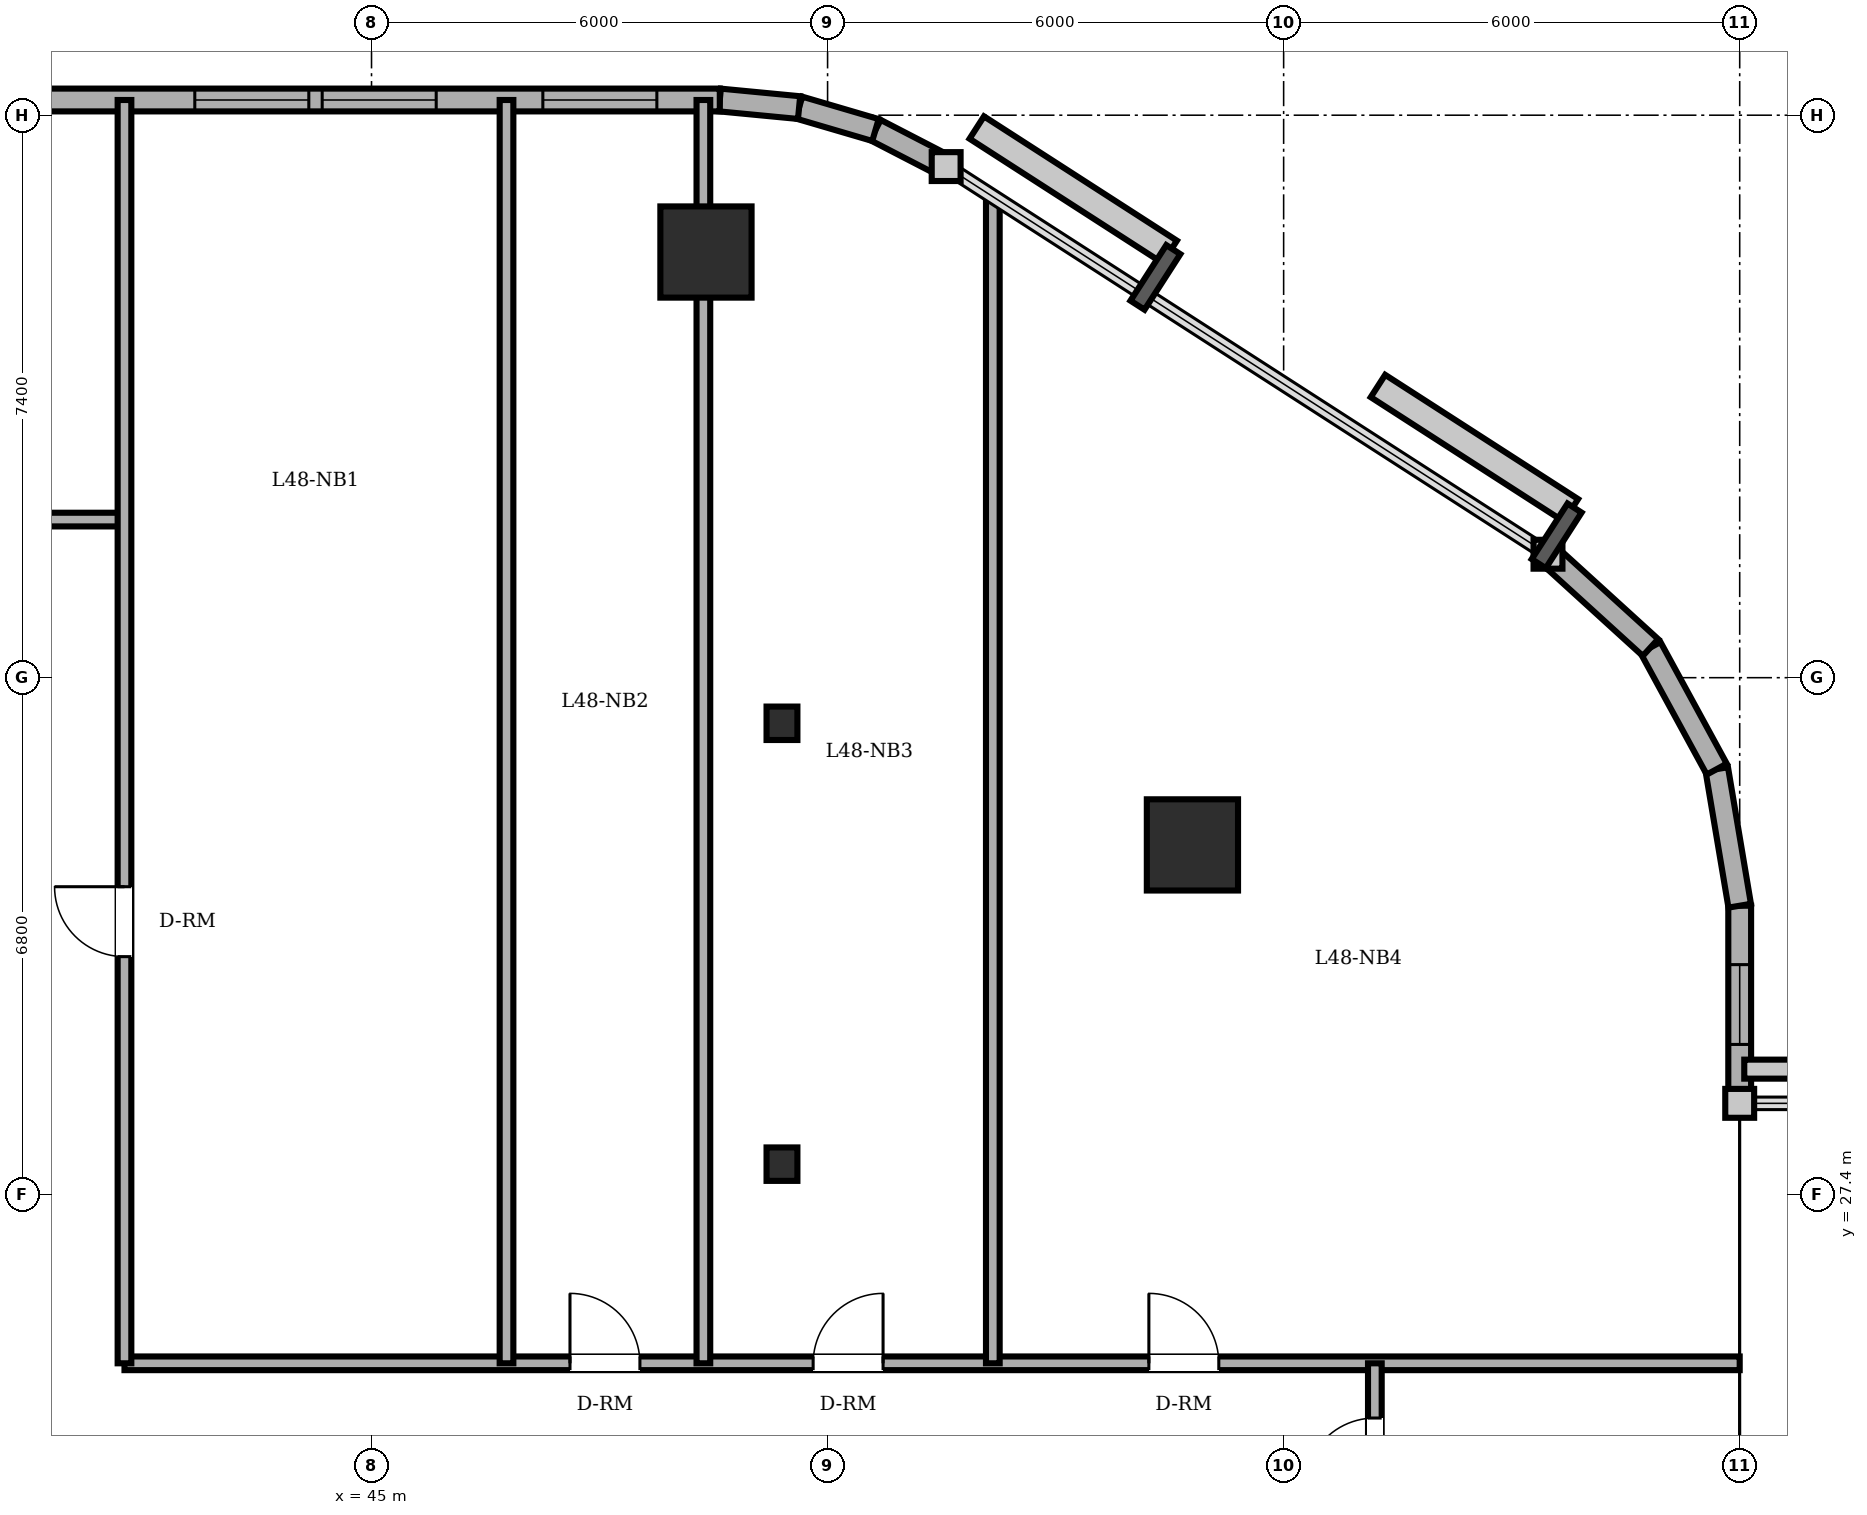
"""IFC4 building model, lengths in metres.
Left out: names, types, materials, properties, quantities, classifications, styles, units other than length and angle.
Written with IfcOpenShell. Run it as: python <this file> out.ifc"""

import sys

from ifc_helpers import new_model, si_unit, direction, frame, frame_2d, origin, origin_2d, place, context, subcontext, project, spatial, rectangle, circle, i_section, extrude, element, fill, save


model = new_model("IFC4")
c1 = context("Model", 3, precision=1e-05, world=origin(), true_north=direction((0.0, 1.0)))
c2 = subcontext(c1, "Body", "Model", "MODEL_VIEW")
j1 = project(units=[si_unit("LENGTHUNIT", "METRE"), si_unit("PLANEANGLEUNIT", "RADIAN")], contexts=[c1])
p1 = place(None, origin())
s1 = spatial("IfcSite", under=j1, at=p1, CompositionType="ELEMENT")
p2 = place(p1, origin())
s2 = spatial("IfcBuilding", under=s1, at=p2, CompositionType="ELEMENT")
p3 = place(p2, frame((0.0, 0.0, 183.4)))
s3 = spatial("IfcBuildingStorey", under=s2, at=p3, CompositionType="ELEMENT", Elevation=183.4)
for number, where, z_axis, x_axis in (
    (1, (55.8, 32.0, 0.0), (0.0, 0.0, 1.0), (1.0, 0.0, 0.0)),
    (2, (49.4, 39.8, 0.0), (0.0, 0.0, 1.0), (1.0, 0.0, 0.0)),
):
    element("IfcColumn", number, at=place(p3, frame(where, z_axis=z_axis, x_axis=x_axis)), inside=s3, PredefinedType="COLUMN", context=c2, shape_type="SweptSolid", body=[
        extrude(circle(Radius=0.6, at=origin_2d()), origin(), (0.0, 0.0, 1.0), 3.6),
    ])
for number, where, z_axis, x_axis in (
    (3, (50.4, 27.8, 0.0), (0.0, 0.0, 1.0), (1.0, 0.0, 0.0)),
    (4, (50.4, 33.6, 0.0), (0.0, 0.0, 1.0), (1.0, 0.0, 0.0)),
):
    element("IfcColumn", number, at=place(p3, frame(where, z_axis=z_axis, x_axis=x_axis)), inside=s3, PredefinedType="COLUMN", context=c2, shape_type="SweptSolid", body=[
        extrude(i_section(OverallWidth=0.406, OverallDepth=0.44, WebThickness=0.024, FlangeThickness=0.039, FilletRadius=0.015, at=origin_2d()), origin(), (0.0, 0.0, 1.0), 3.6),
    ])
p4 = place(p3, frame((63.0, 28.6, 0.0), z_axis=(0.0, 0.0, 1.0), x_axis=(0.0, 1.0, 0.0)))
e5 = element("IfcWall", 5, at=p4, inside=s3, PredefinedType="SOLIDWALL", context=c2, shape_type="SweptSolid", body=[
    extrude(rectangle(XDim=2.6, YDim=0.3, at=frame_2d((1.3, 0.0))), origin(), (0.0, 0.0, 1.0), 3.4),
])
p5 = place(p4, frame((0.775, 0.0, 0.85)))
e6 = element("IfcOpeningElement", 6, at=p5, cuts=e5, PredefinedType="OPENING", context=c2, shape_type="SweptSolid", body=[
    extrude(rectangle(XDim=1.05, YDim=1.55, at=frame_2d((0.525, 0.775))), frame((0.0, 0.16, 0.0), z_axis=(0.0, -1.0, 0.0), x_axis=(1.0, 0.0, 0.0)), (0.0, 0.0, 1.0), 0.32),
])
p6 = place(p3, frame((63.0, 31.2, 0.0), z_axis=(0.0, 0.0, 1.0), x_axis=(-0.165724081207, 0.986172159873, 0.0)))
e7 = element("IfcWall", 7, at=p6, inside=s3, PredefinedType="SOLIDWALL", context=c2, shape_type="SweptSolid", body=[
    extrude(rectangle(XDim=1.822, YDim=0.3, at=frame_2d((0.911, 0.0))), origin(), (0.0, 0.0, 1.0), 3.4),
])
p7 = place(p3, frame((62.698, 32.997, 0.0), z_axis=(0.0, 0.0, 1.0), x_axis=(-0.478608030646, 0.878028674362, 0.0)))
e8 = element("IfcWall", 8, at=p7, inside=s3, PredefinedType="SOLIDWALL", context=c2, shape_type="SweptSolid", body=[
    extrude(rectangle(XDim=1.822, YDim=0.3, at=frame_2d((0.911, 0.0))), origin(), (0.0, 0.0, 1.0), 3.4),
])
p8 = place(p3, frame((61.826, 34.597, 0.0), z_axis=(0.0, 0.0, 1.0), x_axis=(-0.73947929393, 0.673179302897, 0.0)))
e9 = element("IfcWall", 9, at=p8, inside=s3, PredefinedType="SOLIDWALL", context=c2, shape_type="SweptSolid", body=[
    extrude(rectangle(XDim=1.823, YDim=0.3, at=frame_2d((0.911, 0.0))), origin(), (0.0, 0.0, 1.0), 3.4),
])
p9 = place(p3, frame((52.56, 40.924, 0.0), z_axis=(0.0, 0.0, 1.0), x_axis=(-0.888283247196, 0.459296062198, 0.0)))
e10 = element("IfcWall", 10, at=p9, inside=s3, PredefinedType="SOLIDWALL", context=c2, shape_type="SweptSolid", body=[
    extrude(rectangle(XDim=1.047, YDim=0.3, at=frame_2d((0.523, 0.0))), origin(), (0.0, 0.0, 1.0), 3.4),
])
p10 = place(p3, frame((51.63, 41.405, 0.0), z_axis=(0.0, 0.0, 1.0), x_axis=(-0.959528674476, 0.281610942363, 0.0)))
e11 = element("IfcWall", 11, at=p10, inside=s3, PredefinedType="SOLIDWALL", context=c2, shape_type="SweptSolid", body=[
    extrude(rectangle(XDim=1.047, YDim=0.3, at=frame_2d((0.524, 0.0))), origin(), (0.0, 0.0, 1.0), 3.4),
])
p11 = place(p3, frame((50.625, 41.7, 0.0), z_axis=(0.0, 0.0, 1.0), x_axis=(-0.995426089968, 0.095534807324, 0.0)))
e12 = element("IfcWall", 12, at=p11, inside=s3, PredefinedType="SOLIDWALL", context=c2, shape_type="SweptSolid", body=[
    extrude(rectangle(XDim=1.048, YDim=0.3, at=frame_2d((0.524, 0.0))), origin(), (0.0, 0.0, 1.0), 3.4),
])
p12 = place(p3, frame((49.582, 41.8, 0.0), z_axis=(0.0, 0.0, 1.0), x_axis=(-1.0, 0.0, 0.0)))
e13 = element("IfcWall", 13, at=p12, inside=s3, PredefinedType="SOLIDWALL", context=c2, shape_type="SweptSolid", body=[
    extrude(rectangle(XDim=30.282, YDim=0.3, at=frame_2d((15.141, 0.0))), origin(), (0.0, 0.0, 1.0), 3.4),
])
p13 = place(p12, frame((15.107, 0.0, 0.0)))
e14 = element("IfcOpeningElement", 14, at=p13, cuts=e13, PredefinedType="OPENING", context=c2, shape_type="SweptSolid", body=[
    extrude(rectangle(XDim=0.95, YDim=2.2, at=frame_2d((0.475, 1.1))), frame((0.0, 0.16, 0.0), z_axis=(0.0, -1.0, 0.0), x_axis=(1.0, 0.0, 0.0)), (0.0, 0.0, 1.0), 0.32),
])
p14 = place(p12, frame((0.828, 0.0, 0.85)))
e15 = element("IfcOpeningElement", 15, at=p14, cuts=e13, PredefinedType="OPENING", context=c2, shape_type="SweptSolid", body=[
    extrude(rectangle(XDim=1.5, YDim=1.55, at=frame_2d((0.75, 0.775))), frame((0.0, 0.16, 0.0), z_axis=(0.0, -1.0, 0.0), x_axis=(1.0, 0.0, 0.0)), (0.0, 0.0, 1.0), 0.32),
])
p15 = place(p12, frame((3.731, 0.0, 0.85)))
e16 = element("IfcOpeningElement", 16, at=p15, cuts=e13, PredefinedType="OPENING", context=c2, shape_type="SweptSolid", body=[
    extrude(rectangle(XDim=1.5, YDim=1.55, at=frame_2d((0.75, 0.775))), frame((0.0, 0.16, 0.0), z_axis=(0.0, -1.0, 0.0), x_axis=(1.0, 0.0, 0.0)), (0.0, 0.0, 1.0), 0.32),
])
p16 = place(p12, frame((5.407, 0.0, 0.85)))
e17 = element("IfcOpeningElement", 17, at=p16, cuts=e13, PredefinedType="OPENING", context=c2, shape_type="SweptSolid", body=[
    extrude(rectangle(XDim=1.5, YDim=1.55, at=frame_2d((0.75, 0.775))), frame((0.0, 0.16, 0.0), z_axis=(0.0, -1.0, 0.0), x_axis=(1.0, 0.0, 0.0)), (0.0, 0.0, 1.0), 0.32),
])
p17 = place(p12, frame((10.399, 0.0, 0.85)))
e18 = element("IfcOpeningElement", 18, at=p17, cuts=e13, PredefinedType="OPENING", context=c2, shape_type="SweptSolid", body=[
    extrude(rectangle(XDim=1.5, YDim=1.55, at=frame_2d((0.75, 0.775))), frame((0.0, 0.16, 0.0), z_axis=(0.0, -1.0, 0.0), x_axis=(1.0, 0.0, 0.0)), (0.0, 0.0, 1.0), 0.32),
])
p18 = place(p12, frame((18.932, 0.0, 0.85)))
e19 = element("IfcOpeningElement", 19, at=p18, cuts=e13, PredefinedType="OPENING", context=c2, shape_type="SweptSolid", body=[
    extrude(rectangle(XDim=1.5, YDim=1.55, at=frame_2d((0.75, 0.775))), frame((0.0, 0.16, 0.0), z_axis=(0.0, -1.0, 0.0), x_axis=(1.0, 0.0, 0.0)), (0.0, 0.0, 1.0), 0.32),
])
p19 = place(p12, frame((22.532, 0.0, 0.85)))
e20 = element("IfcOpeningElement", 20, at=p19, cuts=e13, PredefinedType="OPENING", context=c2, shape_type="SweptSolid", body=[
    extrude(rectangle(XDim=1.5, YDim=1.55, at=frame_2d((0.75, 0.775))), frame((0.0, 0.16, 0.0), z_axis=(0.0, -1.0, 0.0), x_axis=(1.0, 0.0, 0.0)), (0.0, 0.0, 1.0), 0.32),
])
p20 = place(p12, frame((25.882, 0.0, 0.85)))
e21 = element("IfcOpeningElement", 21, at=p20, cuts=e13, PredefinedType="OPENING", context=c2, shape_type="SweptSolid", body=[
    extrude(rectangle(XDim=1.5, YDim=1.55, at=frame_2d((0.75, 0.775))), frame((0.0, 0.16, 0.0), z_axis=(0.0, -1.0, 0.0), x_axis=(1.0, 0.0, 0.0)), (0.0, 0.0, 1.0), 0.32),
])
p21 = place(p12, frame((27.532, 0.0, 0.85)))
e22 = element("IfcOpeningElement", 22, at=p21, cuts=e13, PredefinedType="OPENING", context=c2, shape_type="SweptSolid", body=[
    extrude(rectangle(XDim=1.5, YDim=1.55, at=frame_2d((0.75, 0.775))), frame((0.0, 0.16, 0.0), z_axis=(0.0, -1.0, 0.0), x_axis=(1.0, 0.0, 0.0)), (0.0, 0.0, 1.0), 0.32),
])
p22 = place(p3, frame((41.75, 25.18, 0.0), z_axis=(0.0, 0.0, 1.0), x_axis=(1.0, 0.0, 0.0)))
e23 = element("IfcWall", 23, at=p22, inside=s3, PredefinedType="PARTITIONING", context=c2, shape_type="SweptSolid", body=[
    extrude(rectangle(XDim=21.25, YDim=0.18, at=frame_2d((10.625, 0.0))), origin(), (0.0, 0.0, 1.0), 3.4),
])
p23 = place(p22, frame((5.861, 0.0, 0.0)))
e24 = element("IfcOpeningElement", 24, at=p23, cuts=e23, PredefinedType="OPENING", context=c2, shape_type="SweptSolid", body=[
    extrude(rectangle(XDim=0.92, YDim=2.1, at=frame_2d((0.46, 1.05))), frame((0.0, 0.1, 0.0), z_axis=(0.0, -1.0, 0.0), x_axis=(1.0, 0.0, 0.0)), (0.0, 0.0, 1.0), 0.2),
])
p24 = place(p22, frame((9.06, 0.0, 0.0)))
e25 = element("IfcOpeningElement", 25, at=p24, cuts=e23, PredefinedType="OPENING", context=c2, shape_type="SweptSolid", body=[
    extrude(rectangle(XDim=0.92, YDim=2.1, at=frame_2d((0.46, 1.05))), frame((0.0, 0.1, 0.0), z_axis=(0.0, -1.0, 0.0), x_axis=(1.0, 0.0, 0.0)), (0.0, 0.0, 1.0), 0.2),
])
p25 = place(p22, frame((13.477, 0.0, 0.0)))
e26 = element("IfcOpeningElement", 26, at=p25, cuts=e23, PredefinedType="OPENING", context=c2, shape_type="SweptSolid", body=[
    extrude(rectangle(XDim=0.92, YDim=2.1, at=frame_2d((0.46, 1.05))), frame((0.0, 0.1, 0.0), z_axis=(0.0, -1.0, 0.0), x_axis=(1.0, 0.0, 0.0)), (0.0, 0.0, 1.0), 0.2),
])
p26 = place(p3, frame((13.8, 36.28, 0.0), z_axis=(0.0, 0.0, 1.0), x_axis=(1.0, 0.0, 0.0)))
e27 = element("IfcWall", 27, at=p26, inside=s3, PredefinedType="PARTITIONING", context=c2, shape_type="SweptSolid", body=[
    extrude(rectangle(XDim=27.95, YDim=0.18, at=frame_2d((13.975, 0.0))), origin(), (0.0, 0.0, 1.0), 3.4),
])
p27 = place(p26, frame((12.05, 0.0, 0.0)))
e28 = element("IfcOpeningElement", 28, at=p27, cuts=e27, PredefinedType="OPENING", context=c2, shape_type="SweptSolid", body=[
    extrude(rectangle(XDim=0.9, YDim=2.1, at=frame_2d((0.45, 1.05))), frame((0.0, 0.1, 0.0), z_axis=(0.0, -1.0, 0.0), x_axis=(1.0, 0.0, 0.0)), (0.0, 0.0, 1.0), 0.2),
])
p28 = place(p26, frame((15.67, 0.0, 0.0)))
e29 = element("IfcOpeningElement", 29, at=p28, cuts=e27, PredefinedType="OPENING", context=c2, shape_type="SweptSolid", body=[
    extrude(rectangle(XDim=0.86, YDim=2.1, at=frame_2d((0.43, 1.05))), frame((0.0, 0.1, 0.0), z_axis=(0.0, -1.0, 0.0), x_axis=(1.0, 0.0, 0.0)), (0.0, 0.0, 1.0), 0.2),
])
p29 = place(p26, frame((5.54, 0.0, 0.0)))
e30 = element("IfcOpeningElement", 30, at=p29, cuts=e27, PredefinedType="OPENING", context=c2, shape_type="SweptSolid", body=[
    extrude(rectangle(XDim=0.92, YDim=2.1, at=frame_2d((0.46, 1.05))), frame((0.0, 0.1, 0.0), z_axis=(0.0, -1.0, 0.0), x_axis=(1.0, 0.0, 0.0)), (0.0, 0.0, 1.0), 0.2),
])
p30 = place(p26, frame((22.255, 0.0, 0.0)))
e31 = element("IfcOpeningElement", 31, at=p30, cuts=e27, PredefinedType="OPENING", context=c2, shape_type="SweptSolid", body=[
    extrude(rectangle(XDim=0.92, YDim=2.1, at=frame_2d((0.46, 1.05))), frame((0.0, 0.1, 0.0), z_axis=(0.0, -1.0, 0.0), x_axis=(1.0, 0.0, 0.0)), (0.0, 0.0, 1.0), 0.2),
])
p31 = place(p3, frame((41.75, 25.18, 0.0), z_axis=(0.0, 0.0, 1.0), x_axis=(0.0, 1.0, 0.0)))
e32 = element("IfcWall", 32, at=p31, inside=s3, PredefinedType="PARTITIONING", context=c2, shape_type="SweptSolid", body=[
    extrude(rectangle(XDim=16.62, YDim=0.18, at=frame_2d((8.31, 0.0))), origin(), (0.0, 0.0, 1.0), 3.4),
])
p32 = place(p31, frame((5.35, 0.0, 0.0)))
e33 = element("IfcOpeningElement", 33, at=p32, cuts=e32, PredefinedType="OPENING", context=c2, shape_type="SweptSolid", body=[
    extrude(rectangle(XDim=0.92, YDim=2.1, at=frame_2d((0.46, 1.05))), frame((0.0, 0.1, 0.0), z_axis=(0.0, -1.0, 0.0), x_axis=(1.0, 0.0, 0.0)), (0.0, 0.0, 1.0), 0.2),
])
p33 = place(p3, frame((46.776, 25.18, 0.0), z_axis=(0.0, 0.0, 1.0), x_axis=(0.0, 1.0, 0.0)))
e34 = element("IfcWall", 34, at=p33, inside=s3, PredefinedType="PARTITIONING", context=c2, shape_type="SweptSolid", body=[
    extrude(rectangle(XDim=16.62, YDim=0.18, at=frame_2d((8.31, 0.0))), origin(), (0.0, 0.0, 1.0), 3.4),
])
p34 = place(p3, frame((49.366, 25.18, 0.0), z_axis=(0.0, 0.0, 1.0), x_axis=(0.0, 1.0, 0.0)))
e35 = element("IfcWall", 35, at=p34, inside=s3, PredefinedType="PARTITIONING", context=c2, shape_type="SweptSolid", body=[
    extrude(rectangle(XDim=16.62, YDim=0.18, at=frame_2d((8.31, 0.0))), origin(), (0.0, 0.0, 1.0), 2.932),
])
p35 = place(p3, frame((53.174, 25.18, 0.0), z_axis=(0.0, 0.0, 1.0), x_axis=(0.0, 1.0, 0.0)))
e36 = element("IfcWall", 36, at=p35, inside=s3, PredefinedType="PARTITIONING", context=c2, shape_type="SweptSolid", body=[
    extrude(rectangle(XDim=15.349, YDim=0.18, at=frame_2d((7.675, 0.0))), origin(), (0.0, 0.0, 1.0), 3.4),
])
p36 = place(p3, frame((58.2, 22.82, 0.0), z_axis=(0.0, 0.0, 1.0), x_axis=(0.0, 1.0, 0.0)))
e37 = element("IfcWall", 37, at=p36, inside=s3, PredefinedType="PARTITIONING", context=c2, shape_type="SweptSolid", body=[
    extrude(rectangle(XDim=2.36, YDim=0.18, at=frame_2d((1.18, 0.0))), origin(), (0.0, 0.0, 1.0), 3.4),
])
p37 = place(p36, frame((0.72, 0.0, 0.0)))
e38 = element("IfcOpeningElement", 38, at=p37, cuts=e37, PredefinedType="OPENING", context=c2, shape_type="SweptSolid", body=[
    extrude(rectangle(XDim=0.92, YDim=2.1, at=frame_2d((0.46, 1.05))), frame((0.0, 0.1, 0.0), z_axis=(0.0, -1.0, 0.0), x_axis=(1.0, 0.0, 0.0)), (0.0, 0.0, 1.0), 0.2),
])
p38 = place(p5, origin())
e39 = element("IfcWindow", 39, at=p38, inside=s3, PartitioningType="SINGLE_PANEL", PredefinedType="WINDOW", context=c2, shape_type="SweptSolid", body=[
    extrude(rectangle(XDim=1.05, YDim=1.55, at=frame_2d((0.525, 0.775))), frame((0.0, 0.03, 0.0), z_axis=(0.0, -1.0, 0.0), x_axis=(1.0, 0.0, 0.0)), (0.0, 0.0, 1.0), 0.06),
])
fill(e6, e39)
p39 = place(p14, origin())
e40 = element("IfcWindow", 40, at=p39, inside=s3, PartitioningType="DOUBLE_PANEL_VERTICAL", PredefinedType="WINDOW", context=c2, shape_type="SweptSolid", body=[
    extrude(rectangle(XDim=1.5, YDim=1.55, at=frame_2d((0.75, 0.775))), frame((0.0, 0.03, 0.0), z_axis=(0.0, -1.0, 0.0), x_axis=(1.0, 0.0, 0.0)), (0.0, 0.0, 1.0), 0.06),
])
fill(e15, e40)
p40 = place(p15, origin())
e41 = element("IfcWindow", 41, at=p40, inside=s3, PartitioningType="DOUBLE_PANEL_VERTICAL", PredefinedType="WINDOW", context=c2, shape_type="SweptSolid", body=[
    extrude(rectangle(XDim=1.5, YDim=1.55, at=frame_2d((0.75, 0.775))), frame((0.0, 0.03, 0.0), z_axis=(0.0, -1.0, 0.0), x_axis=(1.0, 0.0, 0.0)), (0.0, 0.0, 1.0), 0.06),
])
fill(e16, e41)
p41 = place(p16, origin())
e42 = element("IfcWindow", 42, at=p41, inside=s3, PartitioningType="DOUBLE_PANEL_VERTICAL", PredefinedType="WINDOW", context=c2, shape_type="SweptSolid", body=[
    extrude(rectangle(XDim=1.5, YDim=1.55, at=frame_2d((0.75, 0.775))), frame((0.0, 0.03, 0.0), z_axis=(0.0, -1.0, 0.0), x_axis=(1.0, 0.0, 0.0)), (0.0, 0.0, 1.0), 0.06),
])
fill(e17, e42)
p42 = place(p32, origin())
e43 = element("IfcDoor", 43, at=p42, inside=s3, OperationType="SINGLE_SWING_RIGHT", PredefinedType="DOOR", context=c2, shape_type="SweptSolid", body=[
    extrude(rectangle(XDim=0.92, YDim=2.1, at=frame_2d((0.46, 1.05))), frame((0.0, 0.025, 0.0), z_axis=(0.0, -1.0, 0.0), x_axis=(1.0, 0.0, 0.0)), (0.0, 0.0, 1.0), 0.05),
])
fill(e33, e43)
p43 = place(p23, origin())
e44 = element("IfcDoor", 44, at=p43, inside=s3, OperationType="SINGLE_SWING_LEFT", PredefinedType="DOOR", context=c2, shape_type="SweptSolid", body=[
    extrude(rectangle(XDim=0.92, YDim=2.1, at=frame_2d((0.46, 1.05))), frame((0.0, 0.025, 0.0), z_axis=(0.0, -1.0, 0.0), x_axis=(1.0, 0.0, 0.0)), (0.0, 0.0, 1.0), 0.05),
])
fill(e24, e44)
p44 = place(p24, origin())
e45 = element("IfcDoor", 45, at=p44, inside=s3, OperationType="SINGLE_SWING_RIGHT", PredefinedType="DOOR", context=c2, shape_type="SweptSolid", body=[
    extrude(rectangle(XDim=0.92, YDim=2.1, at=frame_2d((0.46, 1.05))), frame((0.0, 0.025, 0.0), z_axis=(0.0, -1.0, 0.0), x_axis=(1.0, 0.0, 0.0)), (0.0, 0.0, 1.0), 0.05),
])
fill(e25, e45)
p45 = place(p25, origin())
e46 = element("IfcDoor", 46, at=p45, inside=s3, OperationType="SINGLE_SWING_LEFT", PredefinedType="DOOR", context=c2, shape_type="SweptSolid", body=[
    extrude(rectangle(XDim=0.92, YDim=2.1, at=frame_2d((0.46, 1.05))), frame((0.0, 0.025, 0.0), z_axis=(0.0, -1.0, 0.0), x_axis=(1.0, 0.0, 0.0)), (0.0, 0.0, 1.0), 0.05),
])
fill(e26, e46)
p46 = place(p37, origin())
e47 = element("IfcDoor", 47, at=p46, inside=s3, OperationType="SINGLE_SWING_LEFT", PredefinedType="DOOR", context=c2, shape_type="SweptSolid", body=[
    extrude(rectangle(XDim=0.92, YDim=2.1, at=frame_2d((0.46, 1.05))), frame((0.0, 0.025, 0.0), z_axis=(0.0, -1.0, 0.0), x_axis=(1.0, 0.0, 0.0)), (0.0, 0.0, 1.0), 0.05),
])
fill(e38, e47)
save(model, sys.argv[1])
